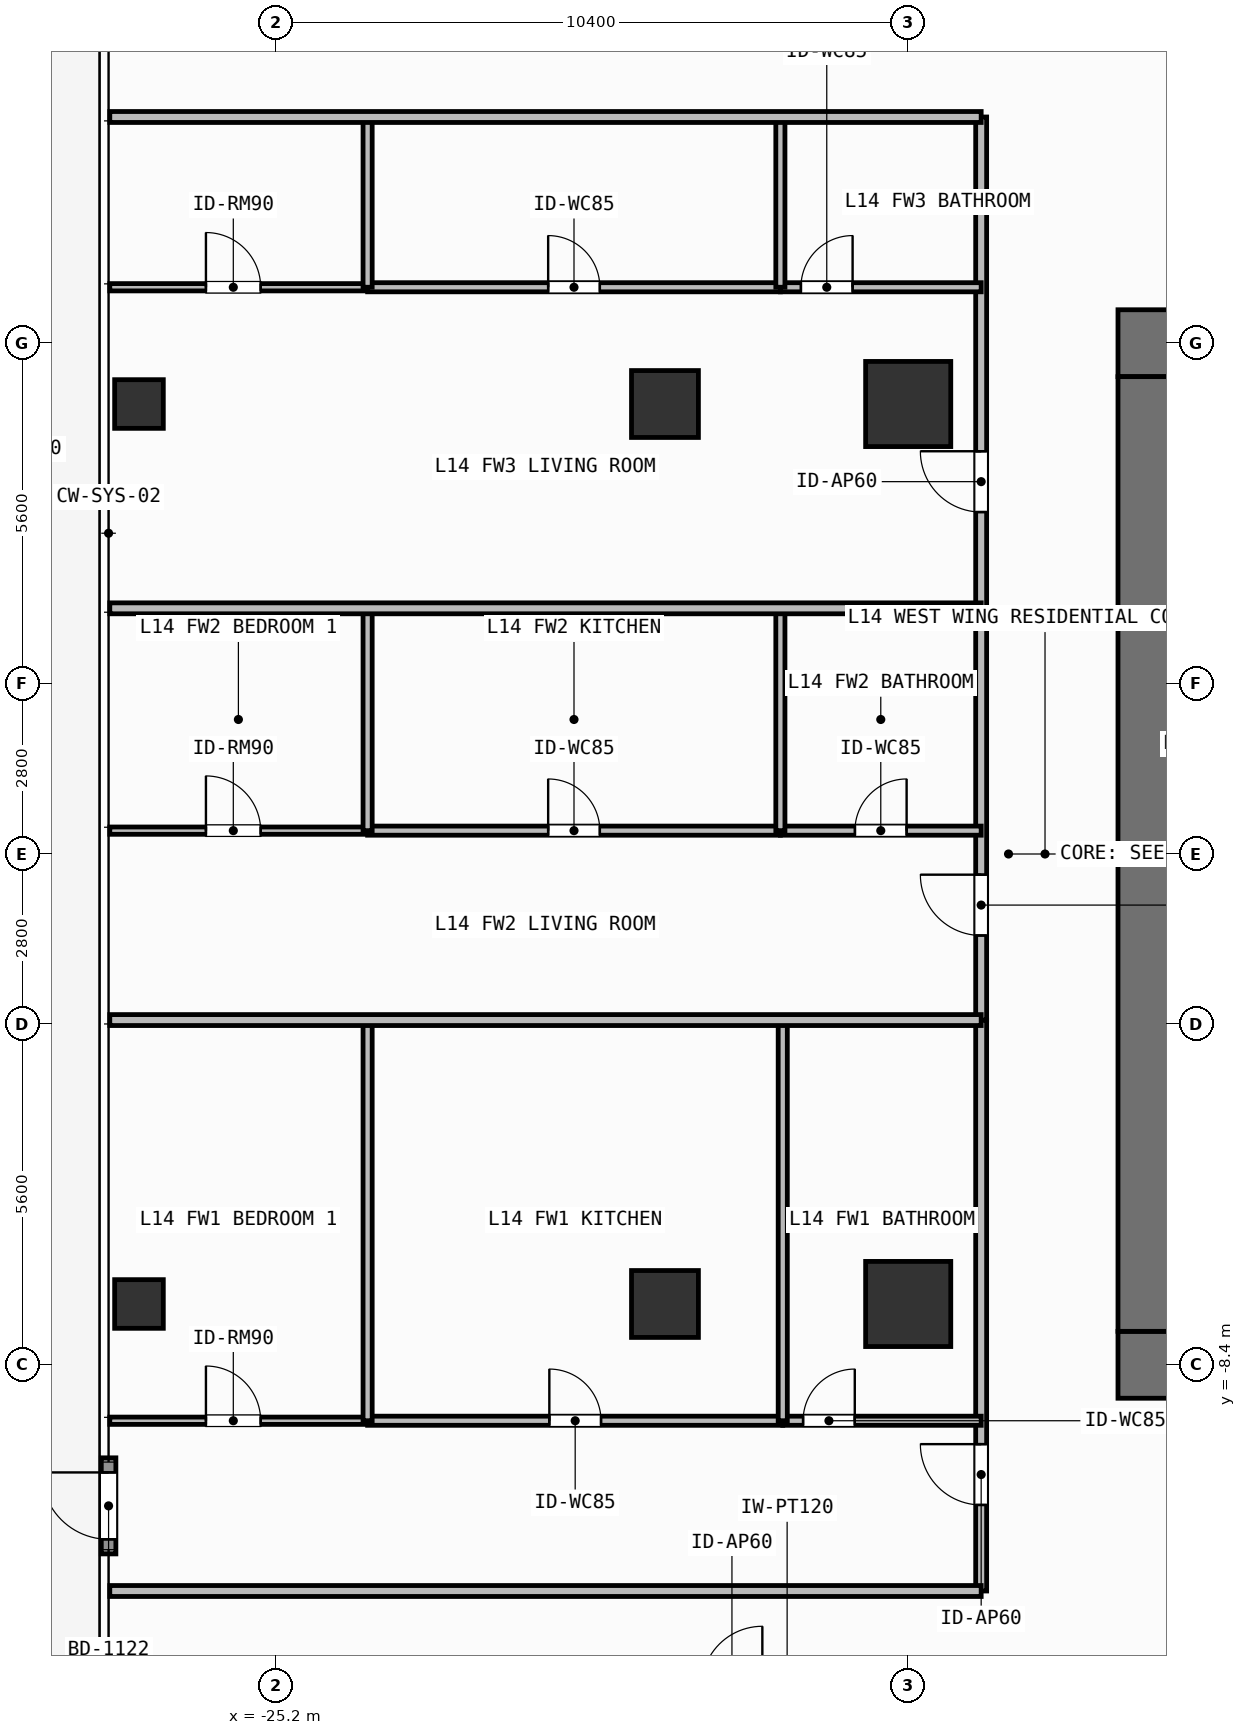
"""IFC4 building model, lengths in metres.
Left out: names, types, materials, properties, quantities, classifications, styles, units other than length and angle.
Written with IfcOpenShell. Run it as: python <this file> out.ifc"""

import sys

from ifc_helpers import new_model, si_unit, direction, frame, frame_2d, origin, origin_2d, place, context, subcontext, project, spatial, rectangle, hollow_rectangle, extrude, element, fill, save


model = new_model("IFC4")
c1 = context("Model", 3, precision=1e-05, world=origin(), true_north=direction((0.0, 1.0)))
c2 = subcontext(c1, "Body", "Model", "MODEL_VIEW")
j1 = project(units=[si_unit("LENGTHUNIT", "METRE"), si_unit("PLANEANGLEUNIT", "RADIAN")], contexts=[c1])
p1 = place(None, origin())
s1 = spatial("IfcSite", under=j1, at=p1, CompositionType="ELEMENT")
p2 = place(p1, origin())
s2 = spatial("IfcBuilding", under=s1, at=p2, CompositionType="ELEMENT")
p3 = place(p2, frame((0.0, 0.0, 54.0)))
s3 = spatial("IfcBuildingStorey", under=s2, at=p3, CompositionType="ELEMENT", Elevation=54.0)
for number, where, z_axis, x_axis in (
    (1, (-11.35, -8.4, 0.0), (0.0, 0.0, 1.0), (1.0, 0.0, 0.0)),
    (2, (-11.35, 8.4, 0.0), (0.0, 0.0, 1.0), (1.0, 0.0, 0.0)),
):
    element("IfcWall", number, at=place(p3, frame(where, z_axis=z_axis, x_axis=x_axis)), inside=s3, PredefinedType="SHEAR", context=c2, shape_type="SweptSolid", body=[
        extrude(rectangle(XDim=1.65, YDim=1.1, at=frame_2d((0.825, 0.0))), origin(), (0.0, 0.0, 1.0), 3.9),
    ])
p4 = place(p3, frame((-10.8, -7.85, 0.0), z_axis=(0.0, 0.0, 1.0), x_axis=(0.0, 1.0, 0.0)))
e3 = element("IfcWall", 3, at=p4, inside=s3, PredefinedType="SHEAR", context=c2, shape_type="SweptSolid", body=[
    extrude(rectangle(XDim=15.7, YDim=1.1, at=frame_2d((7.85, 0.0))), origin(), (0.0, 0.0, 1.0), 3.9),
])
for number, where, z_axis, x_axis in (
    (4, (-14.8, -7.4, 0.0), (0.0, 0.0, 1.0), (1.0, 0.0, 0.0)),
    (5, (-14.8, 7.4, 0.0), (0.0, 0.0, 1.0), (1.0, 0.0, 0.0)),
):
    element("IfcColumn", number, at=place(p3, frame(where, z_axis=z_axis, x_axis=x_axis)), inside=s3, PredefinedType="COLUMN", context=c2, shape_type="SweptSolid", body=[
        extrude(rectangle(XDim=1.4, YDim=1.4, at=origin_2d()), origin(), (0.0, 0.0, 1.0), 3.9),
    ])
for number, where, z_axis, x_axis in (
    (6, (-18.8, -7.4, 0.0), (0.0, 0.0, 1.0), (1.0, 0.0, 0.0)),
    (7, (-18.8, 7.4, 0.0), (0.0, 0.0, 1.0), (1.0, 0.0, 0.0)),
):
    element("IfcColumn", number, at=place(p3, frame(where, z_axis=z_axis, x_axis=x_axis)), inside=s3, PredefinedType="COLUMN", context=c2, shape_type="SweptSolid", body=[
        extrude(rectangle(XDim=1.1, YDim=1.1, at=origin_2d()), origin(), (0.0, 0.0, 1.0), 3.9),
    ])
for number, where, z_axis, x_axis in (
    (8, (-27.45, -7.4, 0.0), (0.0, 0.0, 1.0), (1.0, 0.0, 0.0)),
    (9, (-27.45, 7.4, 0.0), (0.0, 0.0, 1.0), (1.0, 0.0, 0.0)),
):
    element("IfcColumn", number, at=place(p3, frame(where, z_axis=z_axis, x_axis=x_axis)), inside=s3, PredefinedType="COLUMN", context=c2, shape_type="SweptSolid", body=[
        extrude(hollow_rectangle(XDim=0.8, YDim=0.8, WallThickness=0.036, at=origin_2d()), origin(), (0.0, 0.0, 1.0), 3.9),
    ])
p5 = place(p3, frame((-27.95, -11.51, 0.0), z_axis=(0.0, 0.0, 1.0), x_axis=(0.0, 1.0, 0.0)))
e10 = element("IfcWall", 10, at=p5, inside=s3, PredefinedType="SOLIDWALL", context=c2, shape_type="SweptSolid", body=[
    extrude(rectangle(XDim=1.58, YDim=0.24, at=frame_2d((0.79, 0.0))), origin(), (0.0, 0.0, 1.0), 3.68),
])
p6 = place(p5, frame((0.24, 0.0, 0.0)))
e11 = element("IfcOpeningElement", 11, at=p6, cuts=e10, PredefinedType="OPENING", context=c2, shape_type="SweptSolid", body=[
    extrude(rectangle(XDim=1.1, YDim=2.2, at=frame_2d((0.55, 1.1))), frame((0.0, 0.13, 0.0), z_axis=(0.0, -1.0, 0.0), x_axis=(1.0, 0.0, 0.0)), (0.0, 0.0, 1.0), 0.26),
])
p7 = place(p3, frame((-13.6, -12.12, 0.0), z_axis=(0.0, 0.0, 1.0), x_axis=(0.0, 1.0, 0.0)))
e12 = element("IfcWall", 12, at=p7, inside=s3, PredefinedType="PARTITIONING", context=c2, shape_type="SweptSolid", body=[
    extrude(rectangle(XDim=9.389, YDim=0.18, at=frame_2d((4.695, 0.0))), origin(), (0.0, 0.0, 1.0), 3.68),
])
p8 = place(p7, frame((1.415, 0.0, 0.0)))
e13 = element("IfcOpeningElement", 13, at=p8, cuts=e12, PredefinedType="OPENING", context=c2, shape_type="SweptSolid", body=[
    extrude(rectangle(XDim=1.0, YDim=2.2, at=frame_2d((0.5, 1.1))), frame((0.0, 0.1, 0.0), z_axis=(0.0, -1.0, 0.0), x_axis=(1.0, 0.0, 0.0)), (0.0, 0.0, 1.0), 0.2),
])
p9 = place(p3, frame((-23.69, -9.32, 0.0), z_axis=(0.0, 0.0, 1.0), x_axis=(1.0, 0.0, 0.0)))
e14 = element("IfcWall", 14, at=p9, inside=s3, PredefinedType="PARTITIONING", context=c2, shape_type="SweptSolid", body=[
    extrude(rectangle(XDim=6.827, YDim=0.15, at=frame_2d((3.414, 0.0))), origin(), (0.0, 0.0, 1.0), 3.68),
])
p10 = place(p9, frame((2.989, 0.0, 0.0)))
e15 = element("IfcOpeningElement", 15, at=p10, cuts=e14, PredefinedType="OPENING", context=c2, shape_type="SweptSolid", body=[
    extrude(rectangle(XDim=0.85, YDim=2.1, at=frame_2d((0.425, 1.05))), frame((0.0, 0.085, 0.0), z_axis=(0.0, -1.0, 0.0), x_axis=(1.0, 0.0, 0.0)), (0.0, 0.0, 1.0), 0.17),
])
p11 = place(p3, frame((-16.863, -9.32, 0.0), z_axis=(0.0, 0.0, 1.0), x_axis=(1.0, 0.0, 0.0)))
e16 = element("IfcWall", 16, at=p11, inside=s3, PredefinedType="PARTITIONING", context=c2, shape_type="SweptSolid", body=[
    extrude(rectangle(XDim=3.263, YDim=0.15, at=frame_2d((1.631, 0.0))), origin(), (0.0, 0.0, 1.0), 3.68),
])
p12 = place(p11, frame((0.334, 0.0, 0.0)))
e17 = element("IfcOpeningElement", 17, at=p12, cuts=e16, PredefinedType="OPENING", context=c2, shape_type="SweptSolid", body=[
    extrude(rectangle(XDim=0.85, YDim=2.1, at=frame_2d((0.425, 1.05))), frame((0.0, 0.085, 0.0), z_axis=(0.0, -1.0, 0.0), x_axis=(1.0, 0.0, 0.0)), (0.0, 0.0, 1.0), 0.17),
])
p13 = place(p3, frame((-27.93, -9.32, 0.0), z_axis=(0.0, 0.0, 1.0), x_axis=(1.0, 0.0, 0.0)))
e18 = element("IfcWall", 18, at=p13, inside=s3, PredefinedType="PARTITIONING", context=c2, shape_type="SweptSolid", body=[
    extrude(rectangle(XDim=4.24, YDim=0.12, at=frame_2d((2.12, 0.0))), origin(), (0.0, 0.0, 1.0), 3.68),
])
p14 = place(p13, frame((1.581, 0.0, 0.0)))
e19 = element("IfcOpeningElement", 19, at=p14, cuts=e18, PredefinedType="OPENING", context=c2, shape_type="SweptSolid", body=[
    extrude(rectangle(XDim=0.9, YDim=2.1, at=frame_2d((0.45, 1.05))), frame((0.0, 0.07, 0.0), z_axis=(0.0, -1.0, 0.0), x_axis=(1.0, 0.0, 0.0)), (0.0, 0.0, 1.0), 0.14),
])
p15 = place(p3, frame((-13.6, -2.731, 0.0), z_axis=(0.0, 0.0, 1.0), x_axis=(0.0, 1.0, 0.0)))
e20 = element("IfcWall", 20, at=p15, inside=s3, PredefinedType="PARTITIONING", context=c2, shape_type="SweptSolid", body=[
    extrude(rectangle(XDim=6.771, YDim=0.18, at=frame_2d((3.385, 0.0))), origin(), (0.0, 0.0, 1.0), 3.68),
])
p16 = place(p15, frame((1.391, 0.0, 0.0)))
e21 = element("IfcOpeningElement", 21, at=p16, cuts=e20, PredefinedType="OPENING", context=c2, shape_type="SweptSolid", body=[
    extrude(rectangle(XDim=1.0, YDim=2.2, at=frame_2d((0.5, 1.1))), frame((0.0, 0.1, 0.0), z_axis=(0.0, -1.0, 0.0), x_axis=(1.0, 0.0, 0.0)), (0.0, 0.0, 1.0), 0.2),
])
p17 = place(p3, frame((-23.69, 0.384, 0.0), z_axis=(0.0, 0.0, 1.0), x_axis=(1.0, 0.0, 0.0)))
e22 = element("IfcWall", 22, at=p17, inside=s3, PredefinedType="PARTITIONING", context=c2, shape_type="SweptSolid", body=[
    extrude(rectangle(XDim=6.788, YDim=0.15, at=frame_2d((3.394, 0.0))), origin(), (0.0, 0.0, 1.0), 3.68),
])
p18 = place(p17, frame((2.969, 0.0, 0.0)))
e23 = element("IfcOpeningElement", 23, at=p18, cuts=e22, PredefinedType="OPENING", context=c2, shape_type="SweptSolid", body=[
    extrude(rectangle(XDim=0.85, YDim=2.1, at=frame_2d((0.425, 1.05))), frame((0.0, 0.085, 0.0), z_axis=(0.0, -1.0, 0.0), x_axis=(1.0, 0.0, 0.0)), (0.0, 0.0, 1.0), 0.17),
])
p19 = place(p3, frame((-16.902, 0.384, 0.0), z_axis=(0.0, 0.0, 1.0), x_axis=(1.0, 0.0, 0.0)))
e24 = element("IfcWall", 24, at=p19, inside=s3, PredefinedType="PARTITIONING", context=c2, shape_type="SweptSolid", body=[
    extrude(rectangle(XDim=3.302, YDim=0.15, at=frame_2d((1.651, 0.0))), origin(), (0.0, 0.0, 1.0), 3.68),
])
p20 = place(p19, frame((1.226, 0.0, 0.0)))
e25 = element("IfcOpeningElement", 25, at=p20, cuts=e24, PredefinedType="OPENING", context=c2, shape_type="SweptSolid", body=[
    extrude(rectangle(XDim=0.85, YDim=2.1, at=frame_2d((0.425, 1.05))), frame((0.0, 0.085, 0.0), z_axis=(0.0, -1.0, 0.0), x_axis=(1.0, 0.0, 0.0)), (0.0, 0.0, 1.0), 0.17),
])
p21 = place(p3, frame((-27.93, 0.384, 0.0), z_axis=(0.0, 0.0, 1.0), x_axis=(1.0, 0.0, 0.0)))
e26 = element("IfcWall", 26, at=p21, inside=s3, PredefinedType="PARTITIONING", context=c2, shape_type="SweptSolid", body=[
    extrude(rectangle(XDim=4.24, YDim=0.12, at=frame_2d((2.12, 0.0))), origin(), (0.0, 0.0, 1.0), 3.68),
])
p22 = place(p21, frame((1.581, 0.0, 0.0)))
e27 = element("IfcOpeningElement", 27, at=p22, cuts=e26, PredefinedType="OPENING", context=c2, shape_type="SweptSolid", body=[
    extrude(rectangle(XDim=0.9, YDim=2.1, at=frame_2d((0.45, 1.05))), frame((0.0, 0.07, 0.0), z_axis=(0.0, -1.0, 0.0), x_axis=(1.0, 0.0, 0.0)), (0.0, 0.0, 1.0), 0.14),
])
p23 = place(p3, frame((-13.6, 4.04, 0.0), z_axis=(0.0, 0.0, 1.0), x_axis=(0.0, 1.0, 0.0)))
e28 = element("IfcWall", 28, at=p23, inside=s3, PredefinedType="PARTITIONING", context=c2, shape_type="SweptSolid", body=[
    extrude(rectangle(XDim=8.08, YDim=0.18, at=frame_2d((4.04, 0.0))), origin(), (0.0, 0.0, 1.0), 3.68),
])
p24 = place(p23, frame((1.583, 0.0, 0.0)))
e29 = element("IfcOpeningElement", 29, at=p24, cuts=e28, PredefinedType="OPENING", context=c2, shape_type="SweptSolid", body=[
    extrude(rectangle(XDim=1.0, YDim=2.2, at=frame_2d((0.5, 1.1))), frame((0.0, 0.1, 0.0), z_axis=(0.0, -1.0, 0.0), x_axis=(1.0, 0.0, 0.0)), (0.0, 0.0, 1.0), 0.2),
])
p25 = place(p3, frame((-23.69, 9.32, 0.0), z_axis=(0.0, 0.0, 1.0), x_axis=(1.0, 0.0, 0.0)))
e30 = element("IfcWall", 30, at=p25, inside=s3, PredefinedType="PARTITIONING", context=c2, shape_type="SweptSolid", body=[
    extrude(rectangle(XDim=6.788, YDim=0.15, at=frame_2d((3.394, 0.0))), origin(), (0.0, 0.0, 1.0), 3.68),
])
p26 = place(p25, frame((2.969, 0.0, 0.0)))
e31 = element("IfcOpeningElement", 31, at=p26, cuts=e30, PredefinedType="OPENING", context=c2, shape_type="SweptSolid", body=[
    extrude(rectangle(XDim=0.85, YDim=2.1, at=frame_2d((0.425, 1.05))), frame((0.0, 0.085, 0.0), z_axis=(0.0, -1.0, 0.0), x_axis=(1.0, 0.0, 0.0)), (0.0, 0.0, 1.0), 0.17),
])
p27 = place(p3, frame((-16.902, 9.32, 0.0), z_axis=(0.0, 0.0, 1.0), x_axis=(1.0, 0.0, 0.0)))
e32 = element("IfcWall", 32, at=p27, inside=s3, PredefinedType="PARTITIONING", context=c2, shape_type="SweptSolid", body=[
    extrude(rectangle(XDim=3.302, YDim=0.15, at=frame_2d((1.651, 0.0))), origin(), (0.0, 0.0, 1.0), 3.68),
])
p28 = place(p27, frame((0.338, 0.0, 0.0)))
e33 = element("IfcOpeningElement", 33, at=p28, cuts=e32, PredefinedType="OPENING", context=c2, shape_type="SweptSolid", body=[
    extrude(rectangle(XDim=0.85, YDim=2.1, at=frame_2d((0.425, 1.05))), frame((0.0, 0.085, 0.0), z_axis=(0.0, -1.0, 0.0), x_axis=(1.0, 0.0, 0.0)), (0.0, 0.0, 1.0), 0.17),
])
p29 = place(p3, frame((-27.93, 9.32, 0.0), z_axis=(0.0, 0.0, 1.0), x_axis=(1.0, 0.0, 0.0)))
e34 = element("IfcWall", 34, at=p29, inside=s3, PredefinedType="PARTITIONING", context=c2, shape_type="SweptSolid", body=[
    extrude(rectangle(XDim=4.24, YDim=0.12, at=frame_2d((2.12, 0.0))), origin(), (0.0, 0.0, 1.0), 3.68),
])
p30 = place(p29, frame((1.581, 0.0, 0.0)))
e35 = element("IfcOpeningElement", 35, at=p30, cuts=e34, PredefinedType="OPENING", context=c2, shape_type="SweptSolid", body=[
    extrude(rectangle(XDim=0.9, YDim=2.1, at=frame_2d((0.45, 1.05))), frame((0.0, 0.07, 0.0), z_axis=(0.0, -1.0, 0.0), x_axis=(1.0, 0.0, 0.0)), (0.0, 0.0, 1.0), 0.14),
])
for number, where, z_axis, x_axis in (
    (36, (-16.863, -9.32, 0.0), (0.0, 0.0, 1.0), (0.0, 1.0, 0.0)),
    (37, (-23.69, -9.32, 0.0), (0.0, 0.0, 1.0), (0.0, 1.0, 0.0)),
):
    element("IfcWall", number, at=place(p3, frame(where, z_axis=z_axis, x_axis=x_axis)), inside=s3, PredefinedType="PARTITIONING", context=c2, shape_type="SweptSolid", body=[
        extrude(rectangle(XDim=6.589, YDim=0.15, at=frame_2d((3.294, 0.0))), origin(), (0.0, 0.0, 1.0), 3.68),
    ])
for number, where, z_axis, x_axis in (
    (38, (-16.902, 0.384, 0.0), (0.0, 0.0, 1.0), (0.0, 1.0, 0.0)),
    (39, (-23.69, 0.384, 0.0), (0.0, 0.0, 1.0), (0.0, 1.0, 0.0)),
):
    element("IfcWall", number, at=place(p3, frame(where, z_axis=z_axis, x_axis=x_axis)), inside=s3, PredefinedType="PARTITIONING", context=c2, shape_type="SweptSolid", body=[
        extrude(rectangle(XDim=3.656, YDim=0.15, at=frame_2d((1.828, 0.0))), origin(), (0.0, 0.0, 1.0), 3.68),
    ])
p31 = place(p3, frame((-27.93, -2.731, 0.0), z_axis=(0.0, 0.0, 1.0), x_axis=(1.0, 0.0, 0.0)))
e40 = element("IfcWall", 40, at=p31, inside=s3, PredefinedType="PARTITIONING", context=c2, shape_type="SweptSolid", body=[
    extrude(rectangle(XDim=14.33, YDim=0.18, at=frame_2d((7.165, 0.0))), origin(), (0.0, 0.0, 1.0), 3.68),
])
for number, where, z_axis, x_axis in (
    (41, (-16.902, 9.32, 0.0), (0.0, 0.0, 1.0), (0.0, 1.0, 0.0)),
    (42, (-23.69, 9.32, 0.0), (0.0, 0.0, 1.0), (0.0, 1.0, 0.0)),
):
    element("IfcWall", number, at=place(p3, frame(where, z_axis=z_axis, x_axis=x_axis)), inside=s3, PredefinedType="PARTITIONING", context=c2, shape_type="SweptSolid", body=[
        extrude(rectangle(XDim=2.8, YDim=0.15, at=frame_2d((1.4, 0.0))), origin(), (0.0, 0.0, 1.0), 3.68),
    ])
for number, where, z_axis, x_axis in (
    (43, (-27.93, 4.04, 0.0), (0.0, 0.0, 1.0), (1.0, 0.0, 0.0)),
    (44, (-27.93, -12.12, 0.0), (0.0, 0.0, 1.0), (1.0, 0.0, 0.0)),
    (45, (-27.93, 12.12, 0.0), (0.0, 0.0, 1.0), (1.0, 0.0, 0.0)),
):
    element("IfcWall", number, at=place(p3, frame(where, z_axis=z_axis, x_axis=x_axis)), inside=s3, PredefinedType="PARTITIONING", context=c2, shape_type="SweptSolid", body=[
        extrude(rectangle(XDim=14.33, YDim=0.18, at=frame_2d((7.165, 0.0))), origin(), (0.0, 0.0, 1.0), 3.68),
    ])
p32 = place(p6, origin())
e46 = element("IfcDoor", 46, at=p32, inside=s3, OperationType="SINGLE_SWING_RIGHT", PredefinedType="DOOR", context=c2, shape_type="SweptSolid", body=[
    extrude(rectangle(XDim=1.1, YDim=2.2, at=frame_2d((0.55, 1.1))), frame((0.0, 0.025, 0.0), z_axis=(0.0, -1.0, 0.0), x_axis=(1.0, 0.0, 0.0)), (0.0, 0.0, 1.0), 0.05),
])
fill(e11, e46)
p33 = place(p8, origin())
e47 = element("IfcDoor", 47, at=p33, inside=s3, OperationType="SINGLE_SWING_RIGHT", PredefinedType="DOOR", context=c2, shape_type="SweptSolid", body=[
    extrude(rectangle(XDim=1.0, YDim=2.2, at=frame_2d((0.5, 1.1))), frame((0.0, 0.025, 0.0), z_axis=(0.0, -1.0, 0.0), x_axis=(1.0, 0.0, 0.0)), (0.0, 0.0, 1.0), 0.05),
])
fill(e13, e47)
p34 = place(p10, origin())
e48 = element("IfcDoor", 48, at=p34, inside=s3, OperationType="SINGLE_SWING_LEFT", PredefinedType="DOOR", context=c2, shape_type="SweptSolid", body=[
    extrude(rectangle(XDim=0.85, YDim=2.1, at=frame_2d((0.425, 1.05))), frame((0.0, 0.025, 0.0), z_axis=(0.0, -1.0, 0.0), x_axis=(1.0, 0.0, 0.0)), (0.0, 0.0, 1.0), 0.05),
])
fill(e15, e48)
p35 = place(p12, origin())
e49 = element("IfcDoor", 49, at=p35, inside=s3, OperationType="SINGLE_SWING_RIGHT", PredefinedType="DOOR", context=c2, shape_type="SweptSolid", body=[
    extrude(rectangle(XDim=0.85, YDim=2.1, at=frame_2d((0.425, 1.05))), frame((0.0, 0.025, 0.0), z_axis=(0.0, -1.0, 0.0), x_axis=(1.0, 0.0, 0.0)), (0.0, 0.0, 1.0), 0.05),
])
fill(e17, e49)
p36 = place(p14, origin())
e50 = element("IfcDoor", 50, at=p36, inside=s3, OperationType="SINGLE_SWING_LEFT", PredefinedType="DOOR", context=c2, shape_type="SweptSolid", body=[
    extrude(rectangle(XDim=0.9, YDim=2.1, at=frame_2d((0.45, 1.05))), frame((0.0, 0.025, 0.0), z_axis=(0.0, -1.0, 0.0), x_axis=(1.0, 0.0, 0.0)), (0.0, 0.0, 1.0), 0.05),
])
fill(e19, e50)
p37 = place(p16, origin())
e51 = element("IfcDoor", 51, at=p37, inside=s3, OperationType="SINGLE_SWING_RIGHT", PredefinedType="DOOR", context=c2, shape_type="SweptSolid", body=[
    extrude(rectangle(XDim=1.0, YDim=2.2, at=frame_2d((0.5, 1.1))), frame((0.0, 0.025, 0.0), z_axis=(0.0, -1.0, 0.0), x_axis=(1.0, 0.0, 0.0)), (0.0, 0.0, 1.0), 0.05),
])
fill(e21, e51)
p38 = place(p18, origin())
e52 = element("IfcDoor", 52, at=p38, inside=s3, OperationType="SINGLE_SWING_LEFT", PredefinedType="DOOR", context=c2, shape_type="SweptSolid", body=[
    extrude(rectangle(XDim=0.85, YDim=2.1, at=frame_2d((0.425, 1.05))), frame((0.0, 0.025, 0.0), z_axis=(0.0, -1.0, 0.0), x_axis=(1.0, 0.0, 0.0)), (0.0, 0.0, 1.0), 0.05),
])
fill(e23, e52)
p39 = place(p20, origin())
e53 = element("IfcDoor", 53, at=p39, inside=s3, OperationType="SINGLE_SWING_RIGHT", PredefinedType="DOOR", context=c2, shape_type="SweptSolid", body=[
    extrude(rectangle(XDim=0.85, YDim=2.1, at=frame_2d((0.425, 1.05))), frame((0.0, 0.025, 0.0), z_axis=(0.0, -1.0, 0.0), x_axis=(1.0, 0.0, 0.0)), (0.0, 0.0, 1.0), 0.05),
])
fill(e25, e53)
p40 = place(p22, origin())
e54 = element("IfcDoor", 54, at=p40, inside=s3, OperationType="SINGLE_SWING_LEFT", PredefinedType="DOOR", context=c2, shape_type="SweptSolid", body=[
    extrude(rectangle(XDim=0.9, YDim=2.1, at=frame_2d((0.45, 1.05))), frame((0.0, 0.025, 0.0), z_axis=(0.0, -1.0, 0.0), x_axis=(1.0, 0.0, 0.0)), (0.0, 0.0, 1.0), 0.05),
])
fill(e27, e54)
p41 = place(p24, origin())
e55 = element("IfcDoor", 55, at=p41, inside=s3, OperationType="SINGLE_SWING_RIGHT", PredefinedType="DOOR", context=c2, shape_type="SweptSolid", body=[
    extrude(rectangle(XDim=1.0, YDim=2.2, at=frame_2d((0.5, 1.1))), frame((0.0, 0.025, 0.0), z_axis=(0.0, -1.0, 0.0), x_axis=(1.0, 0.0, 0.0)), (0.0, 0.0, 1.0), 0.05),
])
fill(e29, e55)
p42 = place(p26, origin())
e56 = element("IfcDoor", 56, at=p42, inside=s3, OperationType="SINGLE_SWING_LEFT", PredefinedType="DOOR", context=c2, shape_type="SweptSolid", body=[
    extrude(rectangle(XDim=0.85, YDim=2.1, at=frame_2d((0.425, 1.05))), frame((0.0, 0.025, 0.0), z_axis=(0.0, -1.0, 0.0), x_axis=(1.0, 0.0, 0.0)), (0.0, 0.0, 1.0), 0.05),
])
fill(e31, e56)
p43 = place(p28, origin())
e57 = element("IfcDoor", 57, at=p43, inside=s3, OperationType="SINGLE_SWING_RIGHT", PredefinedType="DOOR", context=c2, shape_type="SweptSolid", body=[
    extrude(rectangle(XDim=0.85, YDim=2.1, at=frame_2d((0.425, 1.05))), frame((0.0, 0.025, 0.0), z_axis=(0.0, -1.0, 0.0), x_axis=(1.0, 0.0, 0.0)), (0.0, 0.0, 1.0), 0.05),
])
fill(e33, e57)
p44 = place(p30, origin())
e58 = element("IfcDoor", 58, at=p44, inside=s3, OperationType="SINGLE_SWING_LEFT", PredefinedType="DOOR", context=c2, shape_type="SweptSolid", body=[
    extrude(rectangle(XDim=0.9, YDim=2.1, at=frame_2d((0.45, 1.05))), frame((0.0, 0.025, 0.0), z_axis=(0.0, -1.0, 0.0), x_axis=(1.0, 0.0, 0.0)), (0.0, 0.0, 1.0), 0.05),
])
fill(e35, e58)
save(model, sys.argv[1])
